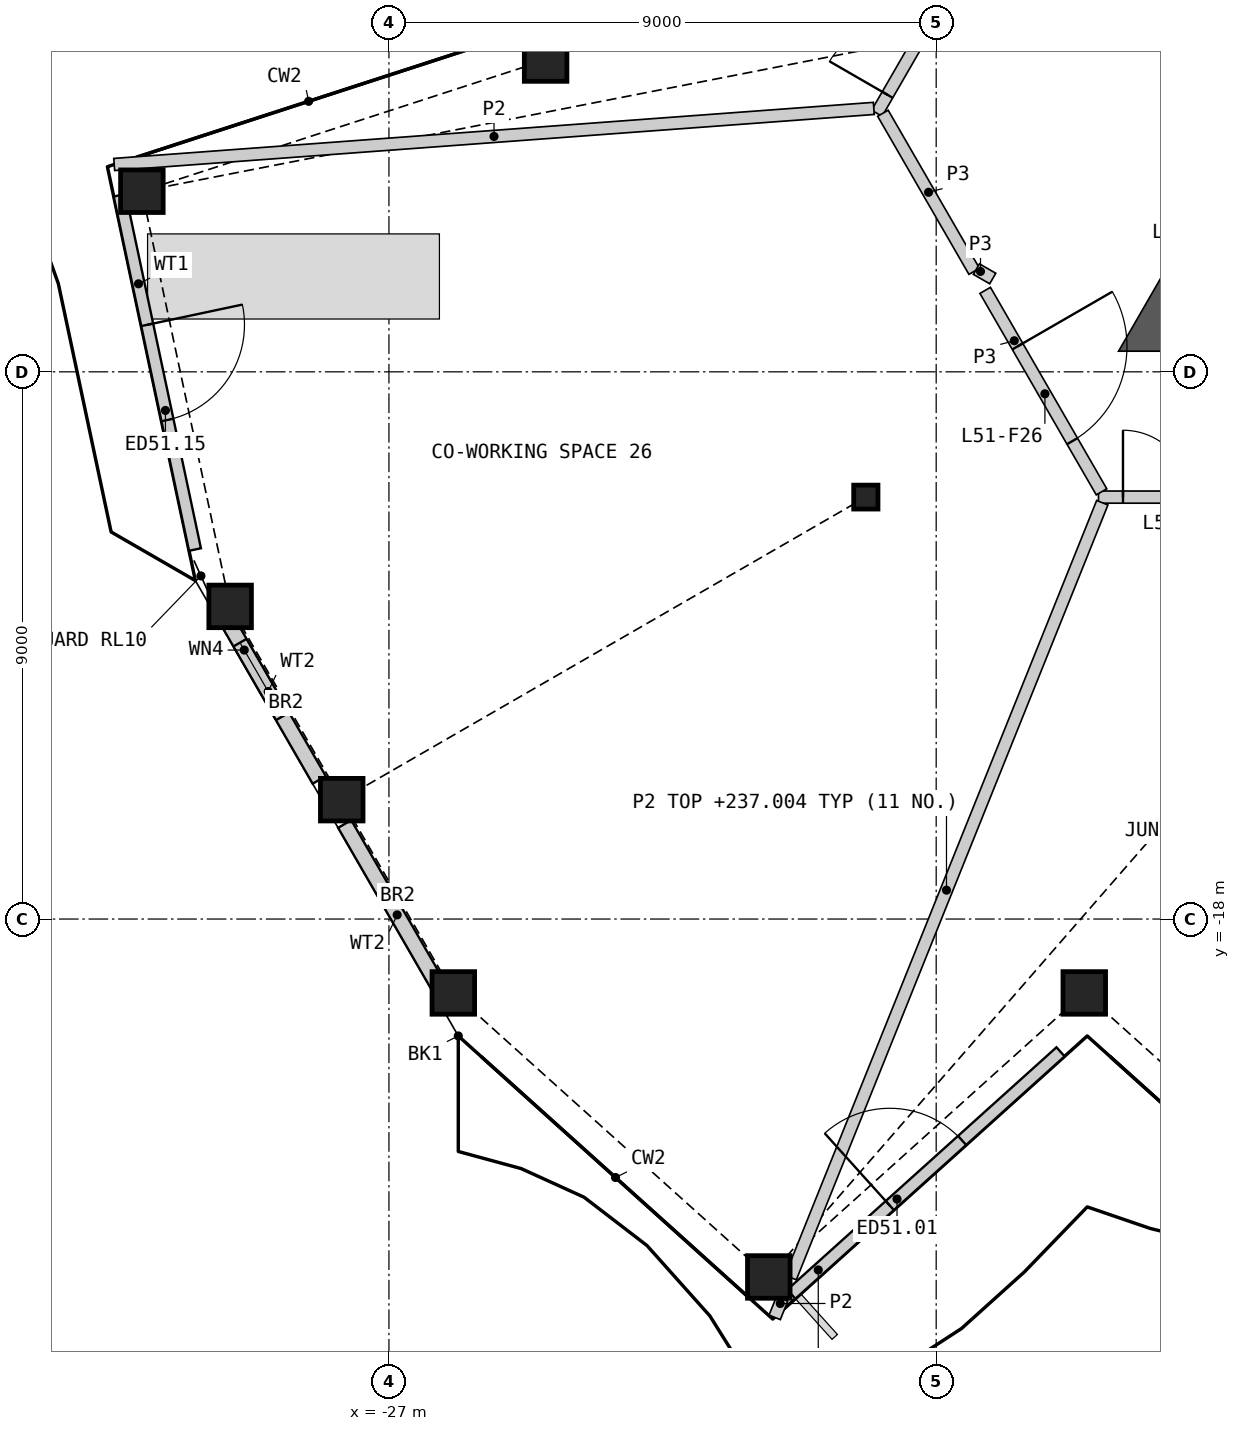
"""IFC4 building model, lengths in metres.
Left out: names, types, materials, properties, quantities, classifications, styles, units other than length and angle.
Written with IfcOpenShell. Run it as: python <this file> out.ifc"""

import sys

from ifc_helpers import new_model, si_unit, direction, frame, frame_2d, origin, origin_2d, place, context, subcontext, project, spatial, polyline, rectangle, hollow_rectangle, i_section, outline, extrude, element, fill, save


model = new_model("IFC4")
c1 = context("Model", 3, precision=1e-05, world=origin(), true_north=direction((0.0, 1.0)))
c2 = subcontext(c1, "Body", "Model", "MODEL_VIEW")
j1 = project(units=[si_unit("LENGTHUNIT", "METRE"), si_unit("PLANEANGLEUNIT", "RADIAN")], contexts=[c1])
p1 = place(None, origin())
s1 = spatial("IfcSite", under=j1, at=p1, CompositionType="ELEMENT")
p2 = place(p1, origin())
s2 = spatial("IfcBuilding", under=s1, at=p2, CompositionType="ELEMENT")
p3 = place(p2, frame((0.0, 0.0, 234.6)))
s3 = spatial("IfcBuildingStorey", under=s2, at=p3, CompositionType="ELEMENT", Elevation=234.6)
for number, where, z_axis, x_axis in (
    (1, (-25.941, -19.215, 0.0), (0.0, 0.0, 1.0), (1.0, 0.0, 0.0)),
    (2, (-20.753, -23.887, 0.0), (0.0, 0.0, 1.0), (1.0, 0.0, 0.0)),
    (3, (-15.565, -19.215, 0.0), (0.0, 0.0, 1.0), (1.0, 0.0, 0.0)),
    (4, (-24.423, -3.872, 0.0), (0.0, 0.0, 1.0), (1.0, 0.0, 0.0)),
    (5, (-31.063, -6.029, 0.0), (0.0, 0.0, 1.0), (1.0, 0.0, 0.0)),
    (6, (-29.612, -12.858, 0.0), (0.0, 0.0, 1.0), (1.0, 0.0, 0.0)),
    (7, (-27.776, -16.037, 0.0), (0.0, 0.0, 1.0), (1.0, 0.0, 0.0)),
):
    element("IfcColumn", number, at=place(p3, frame(where, z_axis=z_axis, x_axis=x_axis)), inside=s3, PredefinedType="COLUMN", context=c2, shape_type="SweptSolid", body=[
        extrude(hollow_rectangle(XDim=0.7, YDim=0.7, WallThickness=0.045, at=origin_2d()), origin(), (0.0, 0.0, 1.0), 3.6),
    ])
p4 = place(p3, frame((-19.157, -11.06, 0.0), z_axis=(0.0, 0.0, 1.0), x_axis=(1.0, 0.0, 0.0)))
e8 = element("IfcColumn", 8, at=p4, inside=s3, PredefinedType="COLUMN", context=c2, shape_type="SweptSolid", body=[
    extrude(i_section(OverallWidth=0.399, OverallDepth=0.393, WebThickness=0.023, FlangeThickness=0.037, at=origin_2d()), origin(), (0.0, 0.0, 1.0), 3.6),
])
p5 = place(p3, frame((-20.382, -24.17, 0.0), z_axis=(0.0, 0.0, 1.0), x_axis=(0.743161684399, 0.669111882155, 0.0)))
e9 = element("IfcWall", 9, at=p5, inside=s3, PredefinedType="SOLIDWALL", context=c2, shape_type="SweptSolid", body=[
    extrude(rectangle(XDim=5.958, YDim=0.2, at=frame_2d((2.979, 0.0))), origin(), (0.0, 0.0, 1.0), 2.701),
])
p6 = place(p5, frame((2.179, 0.0, 0.0)))
e10 = element("IfcOpeningElement", 10, at=p6, cuts=e9, PredefinedType="OPENING", context=c2, shape_type="SweptSolid", body=[
    extrude(rectangle(XDim=1.6, YDim=2.4, at=frame_2d((0.8, 1.2))), frame((0.0, 0.11, 0.0), z_axis=(0.0, -1.0, 0.0), x_axis=(1.0, 0.0, 0.0)), (0.0, 0.0, 1.0), 0.22),
])
p7 = place(p3, frame((-31.428, -6.095, 0.0), z_axis=(0.0, 0.0, 1.0), x_axis=(0.207939137045, -0.978141766456, 0.0)))
e11 = element("IfcWall", 11, at=p7, inside=s3, PredefinedType="SOLIDWALL", context=c2, shape_type="SweptSolid", body=[
    extrude(rectangle(XDim=5.957, YDim=0.2, at=frame_2d((2.979, 0.0))), origin(), (0.0, 0.0, 1.0), 2.701),
])
p8 = place(p7, frame((2.179, 0.0, 0.0)))
e12 = element("IfcOpeningElement", 12, at=p8, cuts=e11, PredefinedType="OPENING", context=c2, shape_type="SweptSolid", body=[
    extrude(rectangle(XDim=1.6, YDim=2.4, at=frame_2d((0.8, 1.2))), frame((0.0, 0.11, 0.0), z_axis=(0.0, -1.0, 0.0), x_axis=(1.0, 0.0, 0.0)), (0.0, 0.0, 1.0), 0.22),
])
p9 = place(p3, frame((-29.825, -12.805, 0.0), z_axis=(0.0, 0.0, 1.0), x_axis=(0.500003693016, -0.86602327161, 0.0)))
e13 = element("IfcWall", 13, at=p9, inside=s3, PredefinedType="SOLIDWALL", context=c2, shape_type="SweptSolid", body=[
    extrude(rectangle(XDim=3.356, YDim=0.25, at=frame_2d((1.678, 0.0))), origin(), (0.0, 0.0, 1.0), 2.701),
])
p10 = place(p9, frame((0.75, 0.0, 1.8)))
e14 = element("IfcOpeningElement", 14, at=p10, cuts=e13, PredefinedType="OPENING", context=c2, shape_type="SweptSolid", body=[
    extrude(rectangle(XDim=1.4, YDim=0.7, at=frame_2d((0.7, 0.35))), frame((0.0, 0.135, 0.0), z_axis=(0.0, -1.0, 0.0), x_axis=(1.0, 0.0, 0.0)), (0.0, 0.0, 1.0), 0.27),
])
p11 = place(p3, frame((-27.728, -16.437, 0.0), z_axis=(0.0, 0.0, 1.0), x_axis=(0.499987726745, -0.866032489635, 0.0)))
e15 = element("IfcWall", 15, at=p11, inside=s3, PredefinedType="SOLIDWALL", context=c2, shape_type="SweptSolid", body=[
    extrude(rectangle(XDim=3.452, YDim=0.25, at=frame_2d((1.726, 0.0))), origin(), (0.0, 0.0, 1.0), 2.701),
])
p12 = place(p3, origin())
e16 = element("IfcWall", 16, at=p12, inside=s3, PredefinedType="SHEAR", context=c2, shape_type="SweptSolid", body=[
    extrude(outline(polyline([(-13.874, -6.71), (-12.748, -7.36), (-12.748, -8.66), (-15.0, -8.66), (-13.874, -6.71)])), origin(), (0.0, 0.0, 1.0), 3.25),
])
p13 = place(p3, frame((-18.976, -4.747, 0.0), z_axis=(0.0, 0.0, 1.0), x_axis=(0.499999852422, 0.866025488988, 0.0)))
e17 = element("IfcWall", 17, at=p13, inside=s3, PredefinedType="PARTITIONING", context=c2, shape_type="SweptSolid", body=[
    extrude(rectangle(XDim=27.198, YDim=0.2, at=frame_2d((13.599, 0.0))), origin(), (0.0, 0.0, 1.0), 3.25),
])
p14 = place(p13, frame((25.346, 0.0, 0.0)))
e18 = element("IfcOpeningElement", 18, at=p14, cuts=e17, PredefinedType="OPENING", context=c2, shape_type="SweptSolid", body=[
    extrude(rectangle(XDim=1.1, YDim=2.1, at=frame_2d((0.55, 1.05))), frame((0.0, 0.11, 0.0), z_axis=(0.0, -1.0, 0.0), x_axis=(1.0, 0.0, 0.0)), (0.0, 0.0, 1.0), 0.22),
])
p15 = place(p13, frame((16.713, 0.0, 0.0)))
e19 = element("IfcOpeningElement", 19, at=p15, cuts=e17, PredefinedType="OPENING", context=c2, shape_type="SweptSolid", body=[
    extrude(rectangle(XDim=1.1, YDim=2.1, at=frame_2d((0.55, 1.05))), frame((0.0, 0.11, 0.0), z_axis=(0.0, -1.0, 0.0), x_axis=(1.0, 0.0, 0.0)), (0.0, 0.0, 1.0), 0.22),
])
p16 = place(p13, frame((0.35, 0.0, 0.0)))
e20 = element("IfcOpeningElement", 20, at=p16, cuts=e17, PredefinedType="OPENING", context=c2, shape_type="SweptSolid", body=[
    extrude(rectangle(XDim=1.1, YDim=2.1, at=frame_2d((0.55, 1.05))), frame((0.0, 0.11, 0.0), z_axis=(0.0, -1.0, 0.0), x_axis=(1.0, 0.0, 0.0)), (0.0, 0.0, 1.0), 0.22),
])
p17 = place(p3, frame((-15.331, -11.06, 0.0), z_axis=(0.0, 0.0, 1.0), x_axis=(1.0, 0.0, 0.0)))
e21 = element("IfcWall", 21, at=p17, inside=s3, PredefinedType="PARTITIONING", context=c2, shape_type="SweptSolid", body=[
    extrude(rectangle(XDim=5.543, YDim=0.2, at=frame_2d((2.771, 0.0))), origin(), (0.0, 0.0, 1.0), 3.25),
])
p18 = place(p17, frame((0.403, 0.0, 0.0)))
e22 = element("IfcOpeningElement", 22, at=p18, cuts=e21, PredefinedType="OPENING", context=c2, shape_type="SweptSolid", body=[
    extrude(rectangle(XDim=1.1, YDim=2.1, at=frame_2d((0.55, 1.05))), frame((0.0, 0.11, 0.0), z_axis=(0.0, -1.0, 0.0), x_axis=(1.0, 0.0, 0.0)), (0.0, 0.0, 1.0), 0.22),
])
p19 = place(p3, frame((-17.194, -7.66, 0.0), z_axis=(0.0, 0.0, 1.0), x_axis=(0.499989446428, -0.866031496806, 0.0)))
e23 = element("IfcWall", 23, at=p19, inside=s3, PredefinedType="PARTITIONING", context=c2, shape_type="SweptSolid", body=[
    extrude(rectangle(XDim=3.826, YDim=0.2, at=frame_2d((1.913, 0.0))), origin(), (0.0, 0.0, 1.0), 3.25),
])
p20 = place(p19, frame((1.064, 0.0, 0.0)))
e24 = element("IfcOpeningElement", 24, at=p20, cuts=e23, PredefinedType="OPENING", context=c2, shape_type="SweptSolid", body=[
    extrude(rectangle(XDim=1.8, YDim=2.1, at=frame_2d((0.9, 1.05))), frame((0.0, 0.11, 0.0), z_axis=(0.0, -1.0, 0.0), x_axis=(1.0, 0.0, 0.0)), (0.0, 0.0, 1.0), 0.22),
])
p21 = place(p3, frame((-18.876, -4.747, 0.0), z_axis=(0.0, 0.0, 1.0), x_axis=(0.499952404951, -0.866052881055, 0.0)))
e25 = element("IfcWall", 25, at=p21, inside=s3, PredefinedType="PARTITIONING", context=c2, shape_type="SweptSolid", body=[
    extrude(rectangle(XDim=3.002, YDim=0.2, at=frame_2d((1.501, 0.0))), origin(), (0.0, 0.0, 1.0), 3.25),
])
p22 = place(p3, frame((-17.338, -7.31, 0.0), z_axis=(0.0, 0.0, 1.0), x_axis=(0.866054481515, -0.499949632511, 0.0)))
e26 = element("IfcWall", 26, at=p22, inside=s3, PredefinedType="PARTITIONING", context=c2, shape_type="SweptSolid", body=[
    extrude(rectangle(XDim=0.31, YDim=0.2, at=frame_2d((0.155, 0.0))), origin(), (0.0, 0.0, 1.0), 3.25),
])
p23 = place(p3, frame((-20.393, -23.897, 0.0), z_axis=(0.0, 0.0, 1.0), x_axis=(0.373096979113, 0.927792349708, 0.0)))
e27 = element("IfcWall", 27, at=p23, inside=s3, PredefinedType="PARTITIONING", context=c2, shape_type="SweptSolid", body=[
    extrude(rectangle(XDim=13.736, YDim=0.2, at=frame_2d((6.868, 0.0))), origin(), (0.0, 0.0, 1.0), 2.404),
])
p24 = place(p3, frame((-31.518, -5.59, 0.0), z_axis=(0.0, 0.0, 1.0), x_axis=(0.99728681237, 0.073613951618, 0.0)))
e28 = element("IfcWall", 28, at=p24, inside=s3, PredefinedType="PARTITIONING", context=c2, shape_type="SweptSolid", body=[
    extrude(rectangle(XDim=12.526, YDim=0.2, at=frame_2d((6.263, 0.0))), origin(), (0.0, 0.0, 1.0), 2.404),
])
p25 = place(p3, frame((-20.656, -24.551, 0.0), z_axis=(0.0, 0.0, 1.0), x_axis=(0.372801499492, 0.927911117498, 0.0)))
e29 = element("IfcWall", 29, at=p25, inside=s3, PredefinedType="PARTITIONING", context=c2, shape_type="SweptSolid", body=[
    extrude(rectangle(XDim=0.328, YDim=0.2, at=frame_2d((0.164, 0.0))), origin(), (0.0, 0.0, 1.0), 2.404),
])
p26 = place(p6, origin())
e30 = element("IfcDoor", 30, at=p26, inside=s3, OperationType="DOUBLE_DOOR_SINGLE_SWING", PredefinedType="DOOR", context=c2, shape_type="SweptSolid", body=[
    extrude(rectangle(XDim=1.6, YDim=2.4, at=frame_2d((0.8, 1.2))), frame((0.0, 0.025, 0.0), z_axis=(0.0, -1.0, 0.0), x_axis=(1.0, 0.0, 0.0)), (0.0, 0.0, 1.0), 0.05),
])
fill(e10, e30)
p27 = place(p8, origin())
e31 = element("IfcDoor", 31, at=p27, inside=s3, OperationType="DOUBLE_DOOR_SINGLE_SWING", PredefinedType="DOOR", context=c2, shape_type="SweptSolid", body=[
    extrude(rectangle(XDim=1.6, YDim=2.4, at=frame_2d((0.8, 1.2))), frame((0.0, 0.025, 0.0), z_axis=(0.0, -1.0, 0.0), x_axis=(1.0, 0.0, 0.0)), (0.0, 0.0, 1.0), 0.05),
])
fill(e12, e31)
p28 = place(p10, origin())
e32 = element("IfcWindow", 32, at=p28, inside=s3, PartitioningType="SINGLE_PANEL", PredefinedType="WINDOW", context=c2, shape_type="SweptSolid", body=[
    extrude(rectangle(XDim=1.4, YDim=0.7, at=frame_2d((0.7, 0.35))), frame((0.0, 0.03, 0.0), z_axis=(0.0, -1.0, 0.0), x_axis=(1.0, 0.0, 0.0)), (0.0, 0.0, 1.0), 0.06),
])
fill(e14, e32)
p29 = place(p18, origin())
e33 = element("IfcDoor", 33, at=p29, inside=s3, OperationType="SINGLE_SWING_LEFT", PredefinedType="DOOR", context=c2, shape_type="SweptSolid", body=[
    extrude(rectangle(XDim=1.1, YDim=2.1, at=frame_2d((0.55, 1.05))), frame((0.0, 0.025, 0.0), z_axis=(0.0, -1.0, 0.0), x_axis=(1.0, 0.0, 0.0)), (0.0, 0.0, 1.0), 0.05),
])
fill(e22, e33)
p30 = place(p16, origin())
e34 = element("IfcDoor", 34, at=p30, inside=s3, OperationType="SINGLE_SWING_LEFT", PredefinedType="DOOR", context=c2, shape_type="SweptSolid", body=[
    extrude(rectangle(XDim=1.1, YDim=2.1, at=frame_2d((0.55, 1.05))), frame((0.0, 0.025, 0.0), z_axis=(0.0, -1.0, 0.0), x_axis=(1.0, 0.0, 0.0)), (0.0, 0.0, 1.0), 0.05),
])
fill(e20, e34)
p31 = place(p20, origin())
e35 = element("IfcDoor", 35, at=p31, inside=s3, OperationType="DOUBLE_DOOR_SINGLE_SWING", PredefinedType="DOOR", context=c2, shape_type="SweptSolid", body=[
    extrude(rectangle(XDim=1.8, YDim=2.1, at=frame_2d((0.9, 1.05))), frame((0.0, 0.025, 0.0), z_axis=(0.0, -1.0, 0.0), x_axis=(1.0, 0.0, 0.0)), (0.0, 0.0, 1.0), 0.05),
])
fill(e24, e35)
save(model, sys.argv[1])
